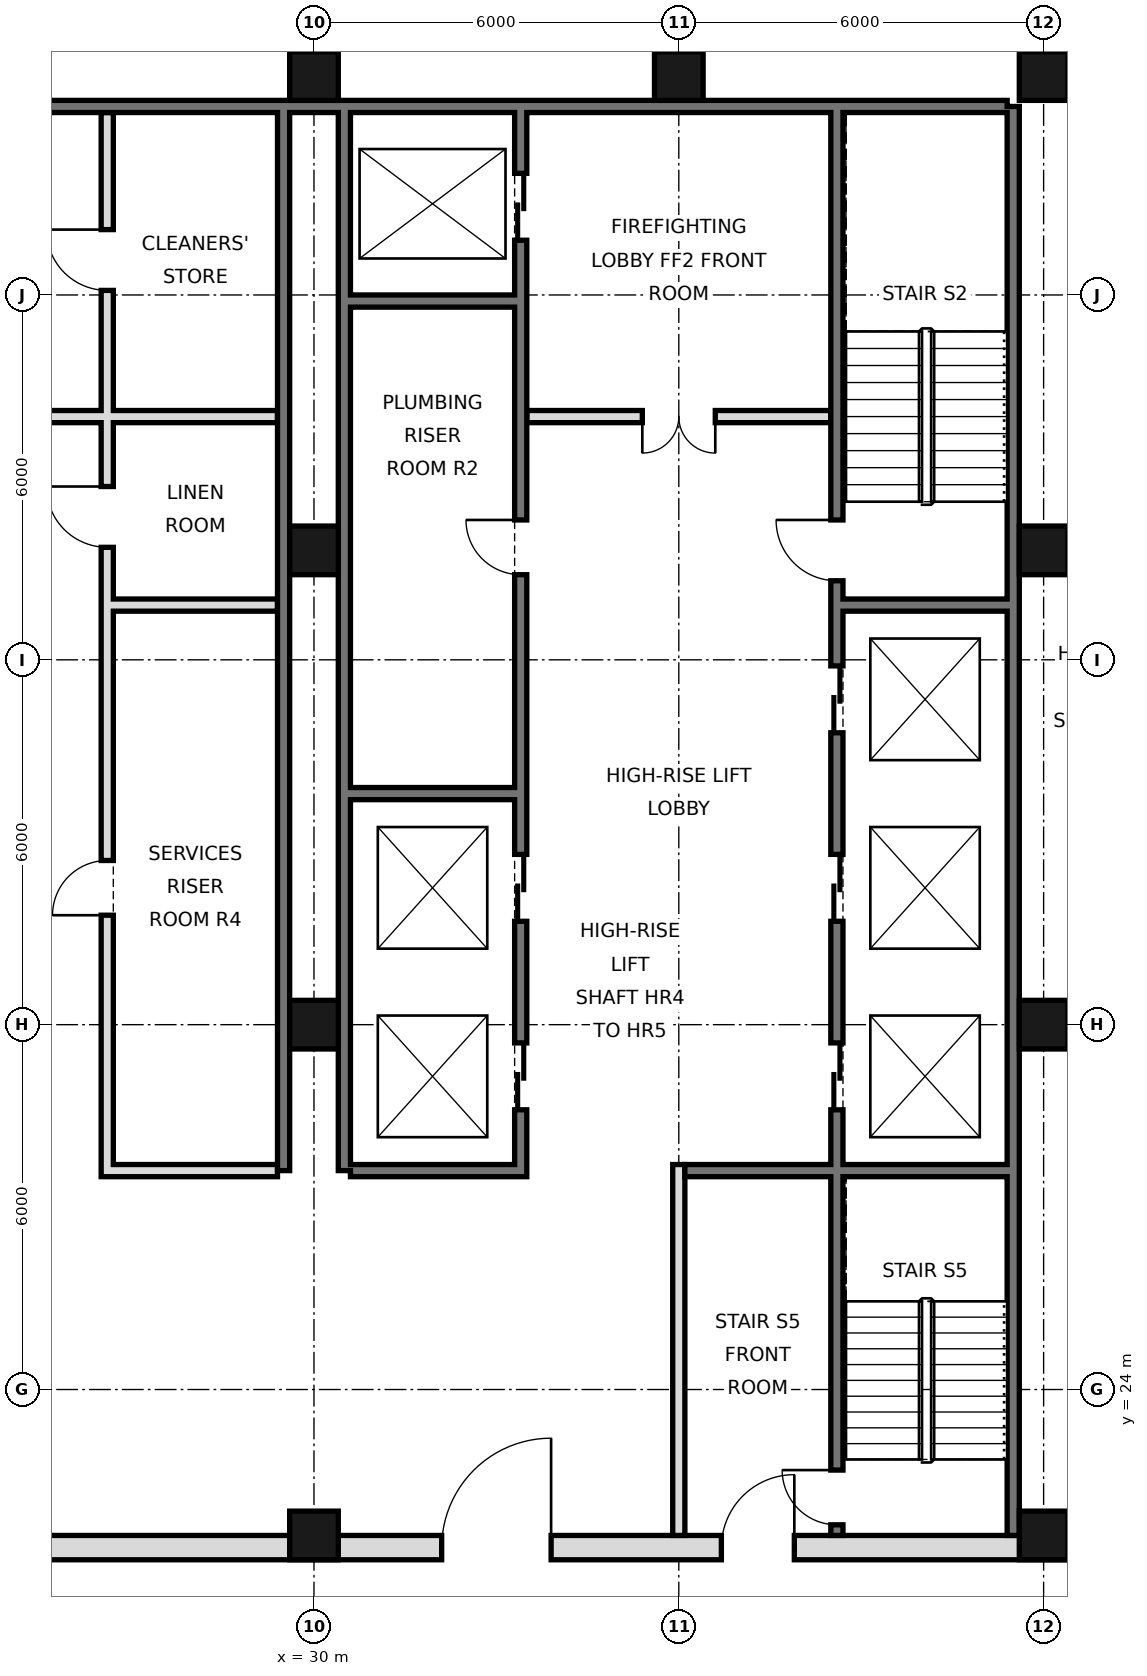
"""IFC4 building model, lengths in metres.
Left out: names, types, materials, properties, quantities, classifications, styles, units other than length and angle.
Written with IfcOpenShell. Run it as: python <this file> out.ifc"""

import sys

from ifc_helpers import new_model, si_unit, direction, frame, frame_2d, origin, origin_2d, place, context, subcontext, project, spatial, rectangle, hollow_rectangle, extrude, element, fill, save


model = new_model("IFC4")
c1 = context("Model", 3, precision=1e-05, world=origin(), true_north=direction((0.0, 1.0)))
c2 = subcontext(c1, "Body", "Model", "MODEL_VIEW")
j1 = project(units=[si_unit("LENGTHUNIT", "METRE"), si_unit("PLANEANGLEUNIT", "RADIAN")], contexts=[c1])
p1 = place(None, origin())
s1 = spatial("IfcSite", under=j1, at=p1, CompositionType="ELEMENT")
p2 = place(p1, origin())
s2 = spatial("IfcBuilding", under=s1, at=p2, CompositionType="ELEMENT")
p3 = place(p2, frame((0.0, 0.0, 254.0)))
s3 = spatial("IfcBuildingStorey", under=s2, at=p3, CompositionType="ELEMENT", Elevation=254.0)
for number, where, z_axis, x_axis in (
    (1, (30.0, 21.6, 0.0), (0.0, 0.0, 1.0), (1.0, 0.0, 0.0)),
    (2, (30.0, 30.0, 0.0), (0.0, 0.0, 1.0), (1.0, 0.0, 0.0)),
    (3, (30.0, 37.8, 0.0), (0.0, 0.0, 1.0), (1.0, 0.0, 0.0)),
    (4, (30.0, 45.6, 0.0), (0.0, 0.0, 1.0), (1.0, 0.0, 0.0)),
    (5, (36.0, 45.6, 0.0), (0.0, 0.0, 1.0), (1.0, 0.0, 0.0)),
    (6, (42.0, 21.6, 0.0), (0.0, 0.0, 1.0), (1.0, 0.0, 0.0)),
    (7, (42.0, 30.0, 0.0), (0.0, 0.0, 1.0), (1.0, 0.0, 0.0)),
    (8, (42.0, 37.8, 0.0), (0.0, 0.0, 1.0), (1.0, 0.0, 0.0)),
    (9, (42.0, 45.6, 0.0), (0.0, 0.0, 1.0), (1.0, 0.0, 0.0)),
):
    element("IfcColumn", number, at=place(p3, frame(where, z_axis=z_axis, x_axis=x_axis)), inside=s3, PredefinedType="COLUMN", context=c2, shape_type="SweptSolid", body=[
        extrude(hollow_rectangle(XDim=0.8, YDim=0.8, WallThickness=0.032, at=origin_2d()), origin(), (0.0, 0.0, 1.0), 3.6),
    ])
p4 = place(p3, frame((41.5, 21.6, 0.0), z_axis=(0.0, 0.0, 1.0), x_axis=(0.0, 1.0, 0.0)))
e10 = element("IfcWall", 10, at=p4, inside=s3, PredefinedType="SOLIDWALL", context=c2, shape_type="SweptSolid", body=[
    extrude(rectangle(XDim=23.5, YDim=0.2, at=frame_2d((11.75, 0.0))), origin(), (0.0, 0.0, 1.0), 3.38),
])
p5 = place(p3, frame((6.6, 45.1, 0.0), z_axis=(0.0, 0.0, 1.0), x_axis=(1.0, 0.0, 0.0)))
e11 = element("IfcWall", 11, at=p5, inside=s3, PredefinedType="SOLIDWALL", context=c2, shape_type="SweptSolid", body=[
    extrude(rectangle(XDim=34.8, YDim=0.2, at=frame_2d((17.4, 0.0))), origin(), (0.0, 0.0, 1.0), 3.38),
])
for number, where, z_axis, x_axis in (
    (12, (29.5, 27.6, 0.0), (0.0, 0.0, 1.0), (0.0, 1.0, 0.0)),
    (13, (30.5, 27.6, 0.0), (0.0, 0.0, 1.0), (0.0, 1.0, 0.0)),
):
    element("IfcWall", number, at=place(p3, frame(where, z_axis=z_axis, x_axis=x_axis)), inside=s3, PredefinedType="SOLIDWALL", context=c2, shape_type="SweptSolid", body=[
        extrude(rectangle(XDim=17.5, YDim=0.2, at=frame_2d((8.75, 0.0))), origin(), (0.0, 0.0, 1.0), 3.38),
    ])
p6 = place(p3, frame((5.6, 21.4, 0.0), z_axis=(0.0, 0.0, 1.0), x_axis=(1.0, 0.0, 0.0)))
e14 = element("IfcWall", 14, at=p6, inside=s3, PredefinedType="SOLIDWALL", context=c2, shape_type="SweptSolid", body=[
    extrude(rectangle(XDim=36.8, YDim=0.4, at=frame_2d((18.4, 0.0))), origin(), (0.0, 0.0, 1.0), 3.38),
])
p7 = place(p6, frame((8.5, 0.0, 0.0)))
e15 = element("IfcOpeningElement", 15, at=p7, cuts=e14, PredefinedType="OPENING", context=c2, shape_type="SweptSolid", body=[
    extrude(rectangle(XDim=1.8, YDim=2.1, at=frame_2d((0.9, 1.05))), frame((0.0, 0.21, 0.0), z_axis=(0.0, -1.0, 0.0), x_axis=(1.0, 0.0, 0.0)), (0.0, 0.0, 1.0), 0.42),
])
p8 = place(p6, frame((17.5, 0.0, 0.0)))
e16 = element("IfcOpeningElement", 16, at=p8, cuts=e14, PredefinedType="OPENING", context=c2, shape_type="SweptSolid", body=[
    extrude(rectangle(XDim=1.8, YDim=2.1, at=frame_2d((0.9, 1.05))), frame((0.0, 0.21, 0.0), z_axis=(0.0, -1.0, 0.0), x_axis=(1.0, 0.0, 0.0)), (0.0, 0.0, 1.0), 0.42),
])
p9 = place(p6, frame((26.5, 0.0, 0.0)))
e17 = element("IfcOpeningElement", 17, at=p9, cuts=e14, PredefinedType="OPENING", context=c2, shape_type="SweptSolid", body=[
    extrude(rectangle(XDim=1.8, YDim=2.1, at=frame_2d((0.9, 1.05))), frame((0.0, 0.21, 0.0), z_axis=(0.0, -1.0, 0.0), x_axis=(1.0, 0.0, 0.0)), (0.0, 0.0, 1.0), 0.42),
])
p10 = place(p6, frame((4.5, 0.0, 0.0)))
e18 = element("IfcOpeningElement", 18, at=p10, cuts=e14, PredefinedType="OPENING", context=c2, shape_type="SweptSolid", body=[
    extrude(rectangle(XDim=1.2, YDim=2.1, at=frame_2d((0.6, 1.05))), frame((0.0, 0.21, 0.0), z_axis=(0.0, -1.0, 0.0), x_axis=(1.0, 0.0, 0.0)), (0.0, 0.0, 1.0), 0.42),
])
p11 = place(p6, frame((31.1, 0.0, 0.0)))
e19 = element("IfcOpeningElement", 19, at=p11, cuts=e14, PredefinedType="OPENING", context=c2, shape_type="SweptSolid", body=[
    extrude(rectangle(XDim=1.2, YDim=2.1, at=frame_2d((0.6, 1.05))), frame((0.0, 0.21, 0.0), z_axis=(0.0, -1.0, 0.0), x_axis=(1.0, 0.0, 0.0)), (0.0, 0.0, 1.0), 0.42),
])
p12 = place(p3, frame((26.6, 27.5, 0.0), z_axis=(0.0, 0.0, 1.0), x_axis=(0.0, 1.0, 0.0)))
e20 = element("IfcWall", 20, at=p12, inside=s3, PredefinedType="SOLIDWALL", context=c2, shape_type="SweptSolid", body=[
    extrude(rectangle(XDim=17.5, YDim=0.2, at=frame_2d((8.75, 0.0))), origin(), (0.0, 0.0, 1.0), 3.38),
])
p13 = place(p12, frame((4.3, 0.0, 0.0)))
e21 = element("IfcOpeningElement", 21, at=p13, cuts=e20, PredefinedType="OPENING", context=c2, shape_type="SweptSolid", body=[
    extrude(rectangle(XDim=0.9, YDim=2.1, at=frame_2d((0.45, 1.05))), frame((0.0, 0.11, 0.0), z_axis=(0.0, -1.0, 0.0), x_axis=(1.0, 0.0, 0.0)), (0.0, 0.0, 1.0), 0.22),
])
p14 = place(p12, frame((10.35, 0.0, 0.0)))
e22 = element("IfcOpeningElement", 22, at=p14, cuts=e20, PredefinedType="OPENING", context=c2, shape_type="SweptSolid", body=[
    extrude(rectangle(XDim=1.0, YDim=2.1, at=frame_2d((0.5, 1.05))), frame((0.0, 0.11, 0.0), z_axis=(0.0, -1.0, 0.0), x_axis=(1.0, 0.0, 0.0)), (0.0, 0.0, 1.0), 0.22),
])
p15 = place(p12, frame((14.575, 0.0, 0.0)))
e23 = element("IfcOpeningElement", 23, at=p15, cuts=e20, PredefinedType="OPENING", context=c2, shape_type="SweptSolid", body=[
    extrude(rectangle(XDim=1.0, YDim=2.1, at=frame_2d((0.5, 1.05))), frame((0.0, 0.11, 0.0), z_axis=(0.0, -1.0, 0.0), x_axis=(1.0, 0.0, 0.0)), (0.0, 0.0, 1.0), 0.22),
])
p16 = place(p3, frame((33.4, 27.5, 0.0), z_axis=(0.0, 0.0, 1.0), x_axis=(0.0, 1.0, 0.0)))
e24 = element("IfcWall", 24, at=p16, inside=s3, PredefinedType="SOLIDWALL", context=c2, shape_type="SweptSolid", body=[
    extrude(rectangle(XDim=17.5, YDim=0.2, at=frame_2d((8.75, 0.0))), origin(), (0.0, 0.0, 1.0), 3.38),
])
p17 = place(p16, frame((1.1, 0.0, 0.0)))
e25 = element("IfcOpeningElement", 25, at=p17, cuts=e24, PredefinedType="OPENING", context=c2, shape_type="SweptSolid", body=[
    extrude(rectangle(XDim=1.1, YDim=2.1, at=frame_2d((0.55, 1.05))), frame((0.0, 0.11, 0.0), z_axis=(0.0, -1.0, 0.0), x_axis=(1.0, 0.0, 0.0)), (0.0, 0.0, 1.0), 0.22),
])
p18 = place(p16, frame((4.2, 0.0, 0.0)))
e26 = element("IfcOpeningElement", 26, at=p18, cuts=e24, PredefinedType="OPENING", context=c2, shape_type="SweptSolid", body=[
    extrude(rectangle(XDim=1.1, YDim=2.1, at=frame_2d((0.55, 1.05))), frame((0.0, 0.11, 0.0), z_axis=(0.0, -1.0, 0.0), x_axis=(1.0, 0.0, 0.0)), (0.0, 0.0, 1.0), 0.22),
])
p19 = place(p16, frame((15.4, 0.0, 0.0)))
e27 = element("IfcOpeningElement", 27, at=p19, cuts=e24, PredefinedType="OPENING", context=c2, shape_type="SweptSolid", body=[
    extrude(rectangle(XDim=1.1, YDim=2.1, at=frame_2d((0.55, 1.05))), frame((0.0, 0.11, 0.0), z_axis=(0.0, -1.0, 0.0), x_axis=(1.0, 0.0, 0.0)), (0.0, 0.0, 1.0), 0.22),
])
p20 = place(p16, frame((9.9, 0.0, 0.0)))
e28 = element("IfcOpeningElement", 28, at=p20, cuts=e24, PredefinedType="OPENING", context=c2, shape_type="SweptSolid", body=[
    extrude(rectangle(XDim=0.9, YDim=2.1, at=frame_2d((0.45, 1.05))), frame((0.0, 0.11, 0.0), z_axis=(0.0, -1.0, 0.0), x_axis=(1.0, 0.0, 0.0)), (0.0, 0.0, 1.0), 0.22),
])
p21 = place(p3, frame((36.0, 21.6, 0.0), z_axis=(0.0, 0.0, 1.0), x_axis=(0.0, 1.0, 0.0)))
e29 = element("IfcWall", 29, at=p21, inside=s3, PredefinedType="PARTITIONING", context=c2, shape_type="SweptSolid", body=[
    extrude(rectangle(XDim=6.1, YDim=0.2, at=frame_2d((3.05, 0.0))), origin(), (0.0, 0.0, 1.0), 3.38),
])
p22 = place(p3, frame((38.6, 21.6, 0.0), z_axis=(0.0, 0.0, 1.0), x_axis=(0.0, 1.0, 0.0)))
e30 = element("IfcWall", 30, at=p22, inside=s3, PredefinedType="SOLIDWALL", context=c2, shape_type="SweptSolid", body=[
    extrude(rectangle(XDim=23.4, YDim=0.2, at=frame_2d((11.7, 0.0))), origin(), (0.0, 0.0, 1.0), 3.38),
])
p23 = place(p22, frame((7.0, 0.0, 0.0)))
e31 = element("IfcOpeningElement", 31, at=p23, cuts=e30, PredefinedType="OPENING", context=c2, shape_type="SweptSolid", body=[
    extrude(rectangle(XDim=1.1, YDim=2.1, at=frame_2d((0.55, 1.05))), frame((0.0, 0.11, 0.0), z_axis=(0.0, -1.0, 0.0), x_axis=(1.0, 0.0, 0.0)), (0.0, 0.0, 1.0), 0.22),
])
p24 = place(p22, frame((10.1, 0.0, 0.0)))
e32 = element("IfcOpeningElement", 32, at=p24, cuts=e30, PredefinedType="OPENING", context=c2, shape_type="SweptSolid", body=[
    extrude(rectangle(XDim=1.1, YDim=2.1, at=frame_2d((0.55, 1.05))), frame((0.0, 0.11, 0.0), z_axis=(0.0, -1.0, 0.0), x_axis=(1.0, 0.0, 0.0)), (0.0, 0.0, 1.0), 0.22),
])
p25 = place(p22, frame((13.2, 0.0, 0.0)))
e33 = element("IfcOpeningElement", 33, at=p25, cuts=e30, PredefinedType="OPENING", context=c2, shape_type="SweptSolid", body=[
    extrude(rectangle(XDim=1.1, YDim=2.1, at=frame_2d((0.55, 1.05))), frame((0.0, 0.11, 0.0), z_axis=(0.0, -1.0, 0.0), x_axis=(1.0, 0.0, 0.0)), (0.0, 0.0, 1.0), 0.22),
])
p26 = place(p22, frame((15.7, 0.0, 0.0)))
e34 = element("IfcOpeningElement", 34, at=p26, cuts=e30, PredefinedType="OPENING", context=c2, shape_type="SweptSolid", body=[
    extrude(rectangle(XDim=1.0, YDim=2.1, at=frame_2d((0.5, 1.05))), frame((0.0, 0.11, 0.0), z_axis=(0.0, -1.0, 0.0), x_axis=(1.0, 0.0, 0.0)), (0.0, 0.0, 1.0), 0.22),
])
p27 = place(p22, frame((0.175, 0.0, 0.0)))
e35 = element("IfcOpeningElement", 35, at=p27, cuts=e30, PredefinedType="OPENING", context=c2, shape_type="SweptSolid", body=[
    extrude(rectangle(XDim=0.9, YDim=2.1, at=frame_2d((0.45, 1.05))), frame((0.0, 0.11, 0.0), z_axis=(0.0, -1.0, 0.0), x_axis=(1.0, 0.0, 0.0)), (0.0, 0.0, 1.0), 0.22),
])
for number, where, z_axis, x_axis in (
    (36, (26.7, 27.6, 0.0), (0.0, 0.0, 1.0), (1.0, 0.0, 0.0)),
    (37, (30.6, 27.6, 0.0), (0.0, 0.0, 1.0), (1.0, 0.0, 0.0)),
):
    element("IfcWall", number, at=place(p3, frame(where, z_axis=z_axis, x_axis=x_axis)), inside=s3, PredefinedType="SOLIDWALL", context=c2, shape_type="SweptSolid", body=[
        extrude(rectangle(XDim=2.7, YDim=0.2, at=frame_2d((1.35, 0.0))), origin(), (0.0, 0.0, 1.0), 3.38),
    ])
p28 = place(p3, frame((36.1, 27.6, 0.0), z_axis=(0.0, 0.0, 1.0), x_axis=(1.0, 0.0, 0.0)))
e38 = element("IfcWall", 38, at=p28, inside=s3, PredefinedType="SOLIDWALL", context=c2, shape_type="SweptSolid", body=[
    extrude(rectangle(XDim=5.3, YDim=0.2, at=frame_2d((2.65, 0.0))), origin(), (0.0, 0.0, 1.0), 3.38),
])
for number, where, z_axis, x_axis in (
    (39, (30.6, 33.8, 0.0), (0.0, 0.0, 1.0), (1.0, 0.0, 0.0)),
    (40, (26.7, 36.9, 0.0), (0.0, 0.0, 1.0), (1.0, 0.0, 0.0)),
    (41, (38.7, 36.9, 0.0), (0.0, 0.0, 1.0), (1.0, 0.0, 0.0)),
):
    element("IfcWall", number, at=place(p3, frame(where, z_axis=z_axis, x_axis=x_axis)), inside=s3, PredefinedType="SOLIDWALL", context=c2, shape_type="SweptSolid", body=[
        extrude(rectangle(XDim=2.7, YDim=0.2, at=frame_2d((1.35, 0.0))), origin(), (0.0, 0.0, 1.0), 3.38),
    ])
p29 = place(p3, frame((21.5, 40.0, 0.0), z_axis=(0.0, 0.0, 1.0), x_axis=(1.0, 0.0, 0.0)))
e42 = element("IfcWall", 42, at=p29, inside=s3, PredefinedType="PARTITIONING", context=c2, shape_type="SweptSolid", body=[
    extrude(rectangle(XDim=7.9, YDim=0.2, at=frame_2d((3.95, 0.0))), origin(), (0.0, 0.0, 1.0), 3.38),
])
p30 = place(p29, frame((1.9, 0.0, 0.0)))
e43 = element("IfcOpeningElement", 43, at=p30, cuts=e42, PredefinedType="OPENING", context=c2, shape_type="SweptSolid", body=[
    extrude(rectangle(XDim=1.2, YDim=2.1, at=frame_2d((0.6, 1.05))), frame((0.0, 0.11, 0.0), z_axis=(0.0, -1.0, 0.0), x_axis=(1.0, 0.0, 0.0)), (0.0, 0.0, 1.0), 0.22),
])
p31 = place(p3, frame((33.5, 40.0, 0.0), z_axis=(0.0, 0.0, 1.0), x_axis=(1.0, 0.0, 0.0)))
e44 = element("IfcWall", 44, at=p31, inside=s3, PredefinedType="PARTITIONING", context=c2, shape_type="SweptSolid", body=[
    extrude(rectangle(XDim=5.0, YDim=0.2, at=frame_2d((2.5, 0.0))), origin(), (0.0, 0.0, 1.0), 3.38),
])
p32 = place(p31, frame((1.9, 0.0, 0.0)))
e45 = element("IfcOpeningElement", 45, at=p32, cuts=e44, PredefinedType="OPENING", context=c2, shape_type="SweptSolid", body=[
    extrude(rectangle(XDim=1.2, YDim=2.1, at=frame_2d((0.6, 1.05))), frame((0.0, 0.11, 0.0), z_axis=(0.0, -1.0, 0.0), x_axis=(1.0, 0.0, 0.0)), (0.0, 0.0, 1.0), 0.22),
])
p33 = place(p3, frame((30.6, 41.9, 0.0), z_axis=(0.0, 0.0, 1.0), x_axis=(1.0, 0.0, 0.0)))
e46 = element("IfcWall", 46, at=p33, inside=s3, PredefinedType="SOLIDWALL", context=c2, shape_type="SweptSolid", body=[
    extrude(rectangle(XDim=2.7, YDim=0.2, at=frame_2d((1.35, 0.0))), origin(), (0.0, 0.0, 1.0), 3.38),
])
p34 = place(p9, frame((1.8, 0.0, 0.0), z_axis=(0.0, 0.0, 1.0), x_axis=(-1.0, 0.0, 0.0)))
e47 = element("IfcDoor", 47, at=p34, inside=s3, OperationType="SINGLE_SWING_LEFT", PredefinedType="DOOR", context=c2, shape_type="SweptSolid", body=[
    extrude(rectangle(XDim=1.8, YDim=2.1, at=frame_2d((0.9, 1.05))), frame((0.0, 0.025, 0.0), z_axis=(0.0, -1.0, 0.0), x_axis=(1.0, 0.0, 0.0)), (0.0, 0.0, 1.0), 0.05),
])
fill(e17, e47)
p35 = place(p11, frame((1.2, 0.0, 0.0), z_axis=(0.0, 0.0, 1.0), x_axis=(-1.0, 0.0, 0.0)))
e48 = element("IfcDoor", 48, at=p35, inside=s3, OperationType="SINGLE_SWING_LEFT", PredefinedType="DOOR", context=c2, shape_type="SweptSolid", body=[
    extrude(rectangle(XDim=1.2, YDim=2.1, at=frame_2d((0.6, 1.05))), frame((0.0, 0.025, 0.0), z_axis=(0.0, -1.0, 0.0), x_axis=(1.0, 0.0, 0.0)), (0.0, 0.0, 1.0), 0.05),
])
fill(e19, e48)
p36 = place(p32, frame((1.2, 0.0, 0.0), z_axis=(0.0, 0.0, 1.0), x_axis=(-1.0, 0.0, 0.0)))
e49 = element("IfcDoor", 49, at=p36, inside=s3, OperationType="DOUBLE_DOOR_SINGLE_SWING", PredefinedType="DOOR", context=c2, shape_type="SweptSolid", body=[
    extrude(rectangle(XDim=1.2, YDim=2.1, at=frame_2d((0.6, 1.05))), frame((0.0, 0.025, 0.0), z_axis=(0.0, -1.0, 0.0), x_axis=(1.0, 0.0, 0.0)), (0.0, 0.0, 1.0), 0.05),
])
fill(e45, e49)
p37 = place(p23, origin())
e50 = element("IfcDoor", 50, at=p37, inside=s3, OperationType="DOUBLE_DOOR_SLIDING", PredefinedType="DOOR", context=c2, shape_type="SweptSolid", body=[
    extrude(rectangle(XDim=1.1, YDim=2.1, at=frame_2d((0.55, 1.05))), frame((0.0, 0.025, 0.0), z_axis=(0.0, -1.0, 0.0), x_axis=(1.0, 0.0, 0.0)), (0.0, 0.0, 1.0), 0.05),
])
fill(e31, e50)
p38 = place(p24, origin())
e51 = element("IfcDoor", 51, at=p38, inside=s3, OperationType="DOUBLE_DOOR_SLIDING", PredefinedType="DOOR", context=c2, shape_type="SweptSolid", body=[
    extrude(rectangle(XDim=1.1, YDim=2.1, at=frame_2d((0.55, 1.05))), frame((0.0, 0.025, 0.0), z_axis=(0.0, -1.0, 0.0), x_axis=(1.0, 0.0, 0.0)), (0.0, 0.0, 1.0), 0.05),
])
fill(e32, e51)
p39 = place(p25, origin())
e52 = element("IfcDoor", 52, at=p39, inside=s3, OperationType="DOUBLE_DOOR_SLIDING", PredefinedType="DOOR", context=c2, shape_type="SweptSolid", body=[
    extrude(rectangle(XDim=1.1, YDim=2.1, at=frame_2d((0.55, 1.05))), frame((0.0, 0.025, 0.0), z_axis=(0.0, -1.0, 0.0), x_axis=(1.0, 0.0, 0.0)), (0.0, 0.0, 1.0), 0.05),
])
fill(e33, e52)
p40 = place(p17, origin())
e53 = element("IfcDoor", 53, at=p40, inside=s3, OperationType="DOUBLE_DOOR_SLIDING", PredefinedType="DOOR", context=c2, shape_type="SweptSolid", body=[
    extrude(rectangle(XDim=1.1, YDim=2.1, at=frame_2d((0.55, 1.05))), frame((0.0, 0.025, 0.0), z_axis=(0.0, -1.0, 0.0), x_axis=(1.0, 0.0, 0.0)), (0.0, 0.0, 1.0), 0.05),
])
fill(e25, e53)
p41 = place(p18, origin())
e54 = element("IfcDoor", 54, at=p41, inside=s3, OperationType="DOUBLE_DOOR_SLIDING", PredefinedType="DOOR", context=c2, shape_type="SweptSolid", body=[
    extrude(rectangle(XDim=1.1, YDim=2.1, at=frame_2d((0.55, 1.05))), frame((0.0, 0.025, 0.0), z_axis=(0.0, -1.0, 0.0), x_axis=(1.0, 0.0, 0.0)), (0.0, 0.0, 1.0), 0.05),
])
fill(e26, e54)
p42 = place(p19, origin())
e55 = element("IfcDoor", 55, at=p42, inside=s3, OperationType="DOUBLE_DOOR_SLIDING", PredefinedType="DOOR", context=c2, shape_type="SweptSolid", body=[
    extrude(rectangle(XDim=1.1, YDim=2.1, at=frame_2d((0.55, 1.05))), frame((0.0, 0.025, 0.0), z_axis=(0.0, -1.0, 0.0), x_axis=(1.0, 0.0, 0.0)), (0.0, 0.0, 1.0), 0.05),
])
fill(e27, e55)
p43 = place(p26, frame((1.0, 0.0, 0.0), z_axis=(0.0, 0.0, 1.0), x_axis=(-1.0, 0.0, 0.0)))
e56 = element("IfcDoor", 56, at=p43, inside=s3, OperationType="SINGLE_SWING_LEFT", PredefinedType="DOOR", context=c2, shape_type="SweptSolid", body=[
    extrude(rectangle(XDim=1.0, YDim=2.1, at=frame_2d((0.5, 1.05))), frame((0.0, 0.025, 0.0), z_axis=(0.0, -1.0, 0.0), x_axis=(1.0, 0.0, 0.0)), (0.0, 0.0, 1.0), 0.05),
])
fill(e34, e56)
p44 = place(p27, frame((0.9, 0.0, 0.0), z_axis=(0.0, 0.0, 1.0), x_axis=(-1.0, 0.0, 0.0)))
e57 = element("IfcDoor", 57, at=p44, inside=s3, OperationType="SINGLE_SWING_LEFT", PredefinedType="DOOR", context=c2, shape_type="SweptSolid", body=[
    extrude(rectangle(XDim=0.9, YDim=2.1, at=frame_2d((0.45, 1.05))), frame((0.0, 0.025, 0.0), z_axis=(0.0, -1.0, 0.0), x_axis=(1.0, 0.0, 0.0)), (0.0, 0.0, 1.0), 0.05),
])
fill(e35, e57)
p45 = place(p20, frame((0.9, 0.0, 0.0), z_axis=(0.0, 0.0, 1.0), x_axis=(-1.0, 0.0, 0.0)))
e58 = element("IfcDoor", 58, at=p45, inside=s3, OperationType="SINGLE_SWING_LEFT", PredefinedType="DOOR", context=c2, shape_type="SweptSolid", body=[
    extrude(rectangle(XDim=0.9, YDim=2.1, at=frame_2d((0.45, 1.05))), frame((0.0, 0.025, 0.0), z_axis=(0.0, -1.0, 0.0), x_axis=(1.0, 0.0, 0.0)), (0.0, 0.0, 1.0), 0.05),
])
fill(e28, e58)
p46 = place(p13, origin())
e59 = element("IfcDoor", 59, at=p46, inside=s3, OperationType="SINGLE_SWING_LEFT", PredefinedType="DOOR", context=c2, shape_type="SweptSolid", body=[
    extrude(rectangle(XDim=0.9, YDim=2.1, at=frame_2d((0.45, 1.05))), frame((0.0, 0.025, 0.0), z_axis=(0.0, -1.0, 0.0), x_axis=(1.0, 0.0, 0.0)), (0.0, 0.0, 1.0), 0.05),
])
fill(e21, e59)
p47 = place(p14, frame((1.0, 0.0, 0.0), z_axis=(0.0, 0.0, 1.0), x_axis=(-1.0, 0.0, 0.0)))
e60 = element("IfcDoor", 60, at=p47, inside=s3, OperationType="SINGLE_SWING_LEFT", PredefinedType="DOOR", context=c2, shape_type="SweptSolid", body=[
    extrude(rectangle(XDim=1.0, YDim=2.1, at=frame_2d((0.5, 1.05))), frame((0.0, 0.025, 0.0), z_axis=(0.0, -1.0, 0.0), x_axis=(1.0, 0.0, 0.0)), (0.0, 0.0, 1.0), 0.05),
])
fill(e22, e60)
p48 = place(p15, frame((1.0, 0.0, 0.0), z_axis=(0.0, 0.0, 1.0), x_axis=(-1.0, 0.0, 0.0)))
e61 = element("IfcDoor", 61, at=p48, inside=s3, OperationType="SINGLE_SWING_LEFT", PredefinedType="DOOR", context=c2, shape_type="SweptSolid", body=[
    extrude(rectangle(XDim=1.0, YDim=2.1, at=frame_2d((0.5, 1.05))), frame((0.0, 0.025, 0.0), z_axis=(0.0, -1.0, 0.0), x_axis=(1.0, 0.0, 0.0)), (0.0, 0.0, 1.0), 0.05),
])
fill(e23, e61)
save(model, sys.argv[1])
